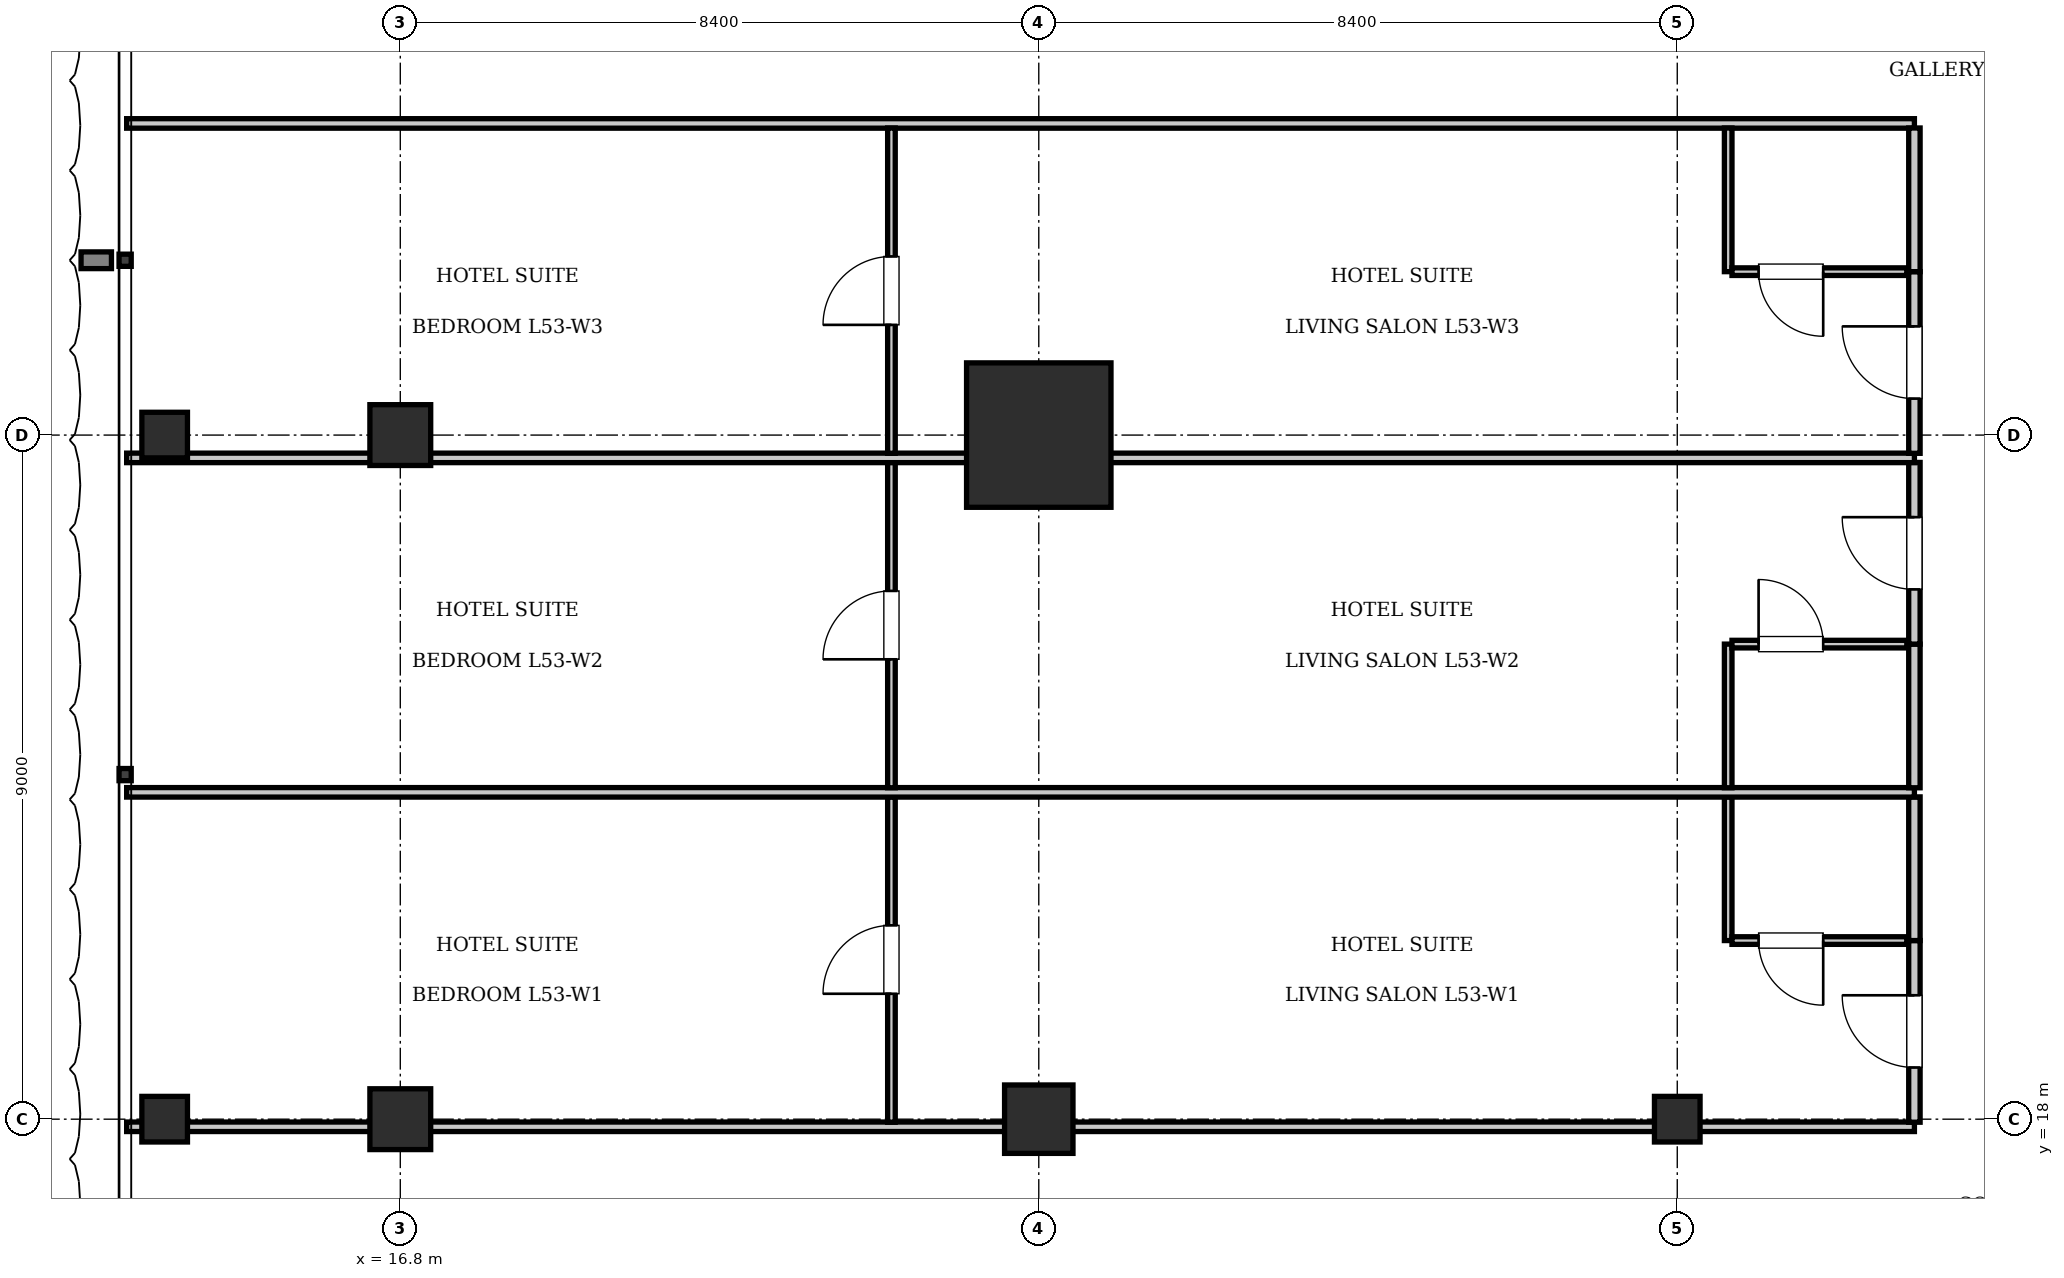
"""IFC4 building model, lengths in metres.
Left out: names, types, materials, properties, quantities, classifications, styles, units other than length and angle.
Written with IfcOpenShell. Run it as: python <this file> out.ifc"""

import sys

from ifc_helpers import new_model, si_unit, direction, frame, frame_2d, origin, origin_2d, place, context, subcontext, project, spatial, rectangle, i_section, extrude, element, fill, save


model = new_model("IFC4")
c1 = context("Model", 3, precision=1e-05, world=origin(), true_north=direction((0.0, 1.0)))
c2 = subcontext(c1, "Body", "Model", "MODEL_VIEW")
j1 = project(units=[si_unit("LENGTHUNIT", "METRE"), si_unit("PLANEANGLEUNIT", "RADIAN")], contexts=[c1])
p1 = place(None, origin())
s1 = spatial("IfcSite", under=j1, at=p1, CompositionType="ELEMENT")
p2 = place(p1, origin())
s2 = spatial("IfcBuilding", under=s1, at=p2, CompositionType="ELEMENT")
p3 = place(p2, frame((0.0, 0.0, 215.95)))
s3 = spatial("IfcBuildingStorey", under=s2, at=p3, CompositionType="ELEMENT", Elevation=215.95)
p4 = place(p3, frame((25.2, 27.0, 0.0), z_axis=(0.0, 0.0, 1.0), x_axis=(1.0, 0.0, 0.0)))
e1 = element("IfcColumn", 1, at=p4, inside=s3, PredefinedType="COLUMN", context=c2, shape_type="SweptSolid", body=[
    extrude(rectangle(XDim=1.9, YDim=1.9, at=origin_2d()), origin(), (0.0, 0.0, 1.0), 3.85),
])
p5 = place(p3, frame((25.2, 18.0, 0.0), z_axis=(0.0, 0.0, 1.0), x_axis=(1.0, 0.0, 0.0)))
e2 = element("IfcColumn", 2, at=p5, inside=s3, PredefinedType="COLUMN", context=c2, shape_type="SweptSolid", body=[
    extrude(rectangle(XDim=0.9, YDim=0.9, at=origin_2d()), origin(), (0.0, 0.0, 1.0), 3.85),
])
p6 = place(p3, frame((33.6, 18.0, 0.0), z_axis=(0.0, 0.0, 1.0), x_axis=(1.0, 0.0, 0.0)))
e3 = element("IfcColumn", 3, at=p6, inside=s3, PredefinedType="COLUMN", context=c2, shape_type="SweptSolid", body=[
    extrude(i_section(OverallWidth=0.6, OverallDepth=0.6, WebThickness=0.025, FlangeThickness=0.038, at=origin_2d()), origin(), (0.0, 0.0, 1.0), 3.85),
])
for number, where, z_axis, x_axis in (
    (4, (16.8, 18.0, 0.0), (0.0, 0.0, 1.0), (1.0, 0.0, 0.0)),
    (5, (16.8, 27.0, 0.0), (0.0, 0.0, 1.0), (1.0, 0.0, 0.0)),
):
    element("IfcColumn", number, at=place(p3, frame(where, z_axis=z_axis, x_axis=x_axis)), inside=s3, PredefinedType="COLUMN", context=c2, shape_type="SweptSolid", body=[
        extrude(rectangle(XDim=0.8, YDim=0.8, at=origin_2d()), origin(), (0.0, 0.0, 1.0), 3.85),
    ])
for number, where, z_axis, x_axis in (
    (6, (13.7, 18.0, 0.0), (0.0, 0.0, 1.0), (1.0, 0.0, 0.0)),
    (7, (13.7, 27.0, 0.0), (0.0, 0.0, 1.0), (1.0, 0.0, 0.0)),
):
    element("IfcColumn", number, at=place(p3, frame(where, z_axis=z_axis, x_axis=x_axis)), inside=s3, PredefinedType="COLUMN", context=c2, shape_type="SweptSolid", body=[
        extrude(i_section(OverallWidth=0.6, OverallDepth=0.6, WebThickness=0.025, FlangeThickness=0.038, at=origin_2d()), origin(), (0.0, 0.0, 1.0), 3.85),
    ])
p7 = place(p3, frame((13.2, 17.9, 0.0), z_axis=(0.0, 0.0, 1.0), x_axis=(1.0, 0.0, 0.0)))
e8 = element("IfcWall", 8, at=p7, inside=s3, PredefinedType="PARTITIONING", context=c2, shape_type="SweptSolid", body=[
    extrude(rectangle(XDim=23.52, YDim=0.125, at=frame_2d((11.76, 0.0))), origin(), (0.0, 0.0, 1.0), 3.071),
])
p8 = place(p3, frame((13.2, 31.1, 0.0), z_axis=(0.0, 0.0, 1.0), x_axis=(1.0, 0.0, 0.0)))
e9 = element("IfcWall", 9, at=p8, inside=s3, PredefinedType="PARTITIONING", context=c2, shape_type="SweptSolid", body=[
    extrude(rectangle(XDim=23.52, YDim=0.125, at=frame_2d((11.76, 0.0))), origin(), (0.0, 0.0, 1.0), 3.61),
])
p9 = place(p3, frame((36.72, 17.96, 0.0), z_axis=(0.0, 0.0, 1.0), x_axis=(0.0, 1.0, 0.0)))
e10 = element("IfcWall", 10, at=p9, inside=s3, PredefinedType="PARTITIONING", context=c2, shape_type="SweptSolid", body=[
    extrude(rectangle(XDim=2.39, YDim=0.15, at=frame_2d((1.195, 0.0))), origin(), (0.0, 0.0, 1.0), 3.61),
])
p10 = place(p9, frame((0.72, 0.0, 0.0)))
e11 = element("IfcOpeningElement", 11, at=p10, cuts=e10, PredefinedType="OPENING", context=c2, shape_type="SweptSolid", body=[
    extrude(rectangle(XDim=0.95, YDim=2.15, at=frame_2d((0.475, 1.075))), frame((0.0, 0.085, 0.0), z_axis=(0.0, -1.0, 0.0), x_axis=(1.0, 0.0, 0.0)), (0.0, 0.0, 1.0), 0.17),
])
p11 = place(p3, frame((36.72, 20.35, 0.0), z_axis=(0.0, 0.0, 1.0), x_axis=(0.0, 1.0, 0.0)))
e12 = element("IfcWall", 12, at=p11, inside=s3, PredefinedType="PARTITIONING", context=c2, shape_type="SweptSolid", body=[
    extrude(rectangle(XDim=1.89, YDim=0.15, at=frame_2d((0.945, 0.0))), origin(), (0.0, 0.0, 1.0), 3.61),
])
p12 = place(p3, frame((34.27, 20.35, 0.0), z_axis=(0.0, 0.0, 1.0), x_axis=(0.0, 1.0, 0.0)))
e13 = element("IfcWall", 13, at=p12, inside=s3, PredefinedType="PARTITIONING", context=c2, shape_type="SweptSolid", body=[
    extrude(rectangle(XDim=1.89, YDim=0.1, at=frame_2d((0.945, 0.0))), origin(), (0.0, 0.0, 1.0), 3.61),
])
p13 = place(p3, frame((34.32, 20.35, 0.0), z_axis=(0.0, 0.0, 1.0), x_axis=(1.0, 0.0, 0.0)))
e14 = element("IfcWall", 14, at=p13, inside=s3, PredefinedType="PARTITIONING", context=c2, shape_type="SweptSolid", body=[
    extrude(rectangle(XDim=2.3, YDim=0.1, at=frame_2d((1.15, 0.0))), origin(), (0.0, 0.0, 1.0), 3.61),
])
p14 = place(p13, frame((0.35, 0.0, 0.0)))
e15 = element("IfcOpeningElement", 15, at=p14, cuts=e14, PredefinedType="OPENING", context=c2, shape_type="SweptSolid", body=[
    extrude(rectangle(XDim=0.85, YDim=2.1, at=frame_2d((0.425, 1.05))), frame((0.0, 0.06, 0.0), z_axis=(0.0, -1.0, 0.0), x_axis=(1.0, 0.0, 0.0)), (0.0, 0.0, 1.0), 0.12),
])
p15 = place(p3, frame((23.262, 17.96, 0.0), z_axis=(0.0, 0.0, 1.0), x_axis=(0.0, 1.0, 0.0)))
e16 = element("IfcWall", 16, at=p15, inside=s3, PredefinedType="PARTITIONING", context=c2, shape_type="SweptSolid", body=[
    extrude(rectangle(XDim=4.28, YDim=0.1, at=frame_2d((2.14, 0.0))), origin(), (0.0, 0.0, 1.0), 3.61),
])
p16 = place(p15, frame((1.69, 0.0, 0.0)))
e17 = element("IfcOpeningElement", 17, at=p16, cuts=e16, PredefinedType="OPENING", context=c2, shape_type="SweptSolid", body=[
    extrude(rectangle(XDim=0.9, YDim=2.1, at=frame_2d((0.45, 1.05))), frame((0.0, 0.06, 0.0), z_axis=(0.0, -1.0, 0.0), x_axis=(1.0, 0.0, 0.0)), (0.0, 0.0, 1.0), 0.12),
])
p17 = place(p3, frame((13.2, 22.3, 0.0), z_axis=(0.0, 0.0, 1.0), x_axis=(1.0, 0.0, 0.0)))
e18 = element("IfcWall", 18, at=p17, inside=s3, PredefinedType="PARTITIONING", context=c2, shape_type="SweptSolid", body=[
    extrude(rectangle(XDim=23.52, YDim=0.125, at=frame_2d((11.76, 0.0))), origin(), (0.0, 0.0, 1.0), 3.61),
])
p18 = place(p3, frame((36.72, 22.36, 0.0), z_axis=(0.0, 0.0, 1.0), x_axis=(0.0, 1.0, 0.0)))
e19 = element("IfcWall", 19, at=p18, inside=s3, PredefinedType="PARTITIONING", context=c2, shape_type="SweptSolid", body=[
    extrude(rectangle(XDim=1.89, YDim=0.15, at=frame_2d((0.945, 0.0))), origin(), (0.0, 0.0, 1.0), 3.61),
])
p19 = place(p3, frame((36.72, 24.25, 0.0), z_axis=(0.0, 0.0, 1.0), x_axis=(0.0, 1.0, 0.0)))
e20 = element("IfcWall", 20, at=p19, inside=s3, PredefinedType="PARTITIONING", context=c2, shape_type="SweptSolid", body=[
    extrude(rectangle(XDim=2.39, YDim=0.15, at=frame_2d((1.195, 0.0))), origin(), (0.0, 0.0, 1.0), 3.61),
])
p20 = place(p19, frame((0.72, 0.0, 0.0)))
e21 = element("IfcOpeningElement", 21, at=p20, cuts=e20, PredefinedType="OPENING", context=c2, shape_type="SweptSolid", body=[
    extrude(rectangle(XDim=0.95, YDim=2.15, at=frame_2d((0.475, 1.075))), frame((0.0, 0.085, 0.0), z_axis=(0.0, -1.0, 0.0), x_axis=(1.0, 0.0, 0.0)), (0.0, 0.0, 1.0), 0.17),
])
p21 = place(p3, frame((34.27, 22.36, 0.0), z_axis=(0.0, 0.0, 1.0), x_axis=(0.0, 1.0, 0.0)))
e22 = element("IfcWall", 22, at=p21, inside=s3, PredefinedType="PARTITIONING", context=c2, shape_type="SweptSolid", body=[
    extrude(rectangle(XDim=1.89, YDim=0.1, at=frame_2d((0.945, 0.0))), origin(), (0.0, 0.0, 1.0), 3.61),
])
p22 = place(p3, frame((34.32, 24.25, 0.0), z_axis=(0.0, 0.0, 1.0), x_axis=(1.0, 0.0, 0.0)))
e23 = element("IfcWall", 23, at=p22, inside=s3, PredefinedType="PARTITIONING", context=c2, shape_type="SweptSolid", body=[
    extrude(rectangle(XDim=2.3, YDim=0.1, at=frame_2d((1.15, 0.0))), origin(), (0.0, 0.0, 1.0), 3.61),
])
p23 = place(p22, frame((0.35, 0.0, 0.0)))
e24 = element("IfcOpeningElement", 24, at=p23, cuts=e23, PredefinedType="OPENING", context=c2, shape_type="SweptSolid", body=[
    extrude(rectangle(XDim=0.85, YDim=2.1, at=frame_2d((0.425, 1.05))), frame((0.0, 0.06, 0.0), z_axis=(0.0, -1.0, 0.0), x_axis=(1.0, 0.0, 0.0)), (0.0, 0.0, 1.0), 0.12),
])
p24 = place(p3, frame((23.262, 22.36, 0.0), z_axis=(0.0, 0.0, 1.0), x_axis=(0.0, 1.0, 0.0)))
e25 = element("IfcWall", 25, at=p24, inside=s3, PredefinedType="PARTITIONING", context=c2, shape_type="SweptSolid", body=[
    extrude(rectangle(XDim=4.28, YDim=0.1, at=frame_2d((2.14, 0.0))), origin(), (0.0, 0.0, 1.0), 3.61),
])
p25 = place(p24, frame((1.69, 0.0, 0.0)))
e26 = element("IfcOpeningElement", 26, at=p25, cuts=e25, PredefinedType="OPENING", context=c2, shape_type="SweptSolid", body=[
    extrude(rectangle(XDim=0.9, YDim=2.1, at=frame_2d((0.45, 1.05))), frame((0.0, 0.06, 0.0), z_axis=(0.0, -1.0, 0.0), x_axis=(1.0, 0.0, 0.0)), (0.0, 0.0, 1.0), 0.12),
])
p26 = place(p3, frame((13.2, 26.7, 0.0), z_axis=(0.0, 0.0, 1.0), x_axis=(1.0, 0.0, 0.0)))
e27 = element("IfcWall", 27, at=p26, inside=s3, PredefinedType="PARTITIONING", context=c2, shape_type="SweptSolid", body=[
    extrude(rectangle(XDim=23.52, YDim=0.125, at=frame_2d((11.76, 0.0))), origin(), (0.0, 0.0, 1.0), 3.61),
])
p27 = place(p3, frame((36.72, 26.76, 0.0), z_axis=(0.0, 0.0, 1.0), x_axis=(0.0, 1.0, 0.0)))
e28 = element("IfcWall", 28, at=p27, inside=s3, PredefinedType="PARTITIONING", context=c2, shape_type="SweptSolid", body=[
    extrude(rectangle(XDim=2.39, YDim=0.15, at=frame_2d((1.195, 0.0))), origin(), (0.0, 0.0, 1.0), 3.61),
])
p28 = place(p27, frame((0.72, 0.0, 0.0)))
e29 = element("IfcOpeningElement", 29, at=p28, cuts=e28, PredefinedType="OPENING", context=c2, shape_type="SweptSolid", body=[
    extrude(rectangle(XDim=0.95, YDim=2.15, at=frame_2d((0.475, 1.075))), frame((0.0, 0.085, 0.0), z_axis=(0.0, -1.0, 0.0), x_axis=(1.0, 0.0, 0.0)), (0.0, 0.0, 1.0), 0.17),
])
p29 = place(p3, frame((36.72, 29.15, 0.0), z_axis=(0.0, 0.0, 1.0), x_axis=(0.0, 1.0, 0.0)))
e30 = element("IfcWall", 30, at=p29, inside=s3, PredefinedType="PARTITIONING", context=c2, shape_type="SweptSolid", body=[
    extrude(rectangle(XDim=1.89, YDim=0.15, at=frame_2d((0.945, 0.0))), origin(), (0.0, 0.0, 1.0), 3.61),
])
p30 = place(p3, frame((34.27, 29.15, 0.0), z_axis=(0.0, 0.0, 1.0), x_axis=(0.0, 1.0, 0.0)))
e31 = element("IfcWall", 31, at=p30, inside=s3, PredefinedType="PARTITIONING", context=c2, shape_type="SweptSolid", body=[
    extrude(rectangle(XDim=1.89, YDim=0.1, at=frame_2d((0.945, 0.0))), origin(), (0.0, 0.0, 1.0), 3.61),
])
p31 = place(p3, frame((34.32, 29.15, 0.0), z_axis=(0.0, 0.0, 1.0), x_axis=(1.0, 0.0, 0.0)))
e32 = element("IfcWall", 32, at=p31, inside=s3, PredefinedType="PARTITIONING", context=c2, shape_type="SweptSolid", body=[
    extrude(rectangle(XDim=2.3, YDim=0.1, at=frame_2d((1.15, 0.0))), origin(), (0.0, 0.0, 1.0), 3.61),
])
p32 = place(p31, frame((0.35, 0.0, 0.0)))
e33 = element("IfcOpeningElement", 33, at=p32, cuts=e32, PredefinedType="OPENING", context=c2, shape_type="SweptSolid", body=[
    extrude(rectangle(XDim=0.85, YDim=2.1, at=frame_2d((0.425, 1.05))), frame((0.0, 0.06, 0.0), z_axis=(0.0, -1.0, 0.0), x_axis=(1.0, 0.0, 0.0)), (0.0, 0.0, 1.0), 0.12),
])
p33 = place(p3, frame((23.262, 26.76, 0.0), z_axis=(0.0, 0.0, 1.0), x_axis=(0.0, 1.0, 0.0)))
e34 = element("IfcWall", 34, at=p33, inside=s3, PredefinedType="PARTITIONING", context=c2, shape_type="SweptSolid", body=[
    extrude(rectangle(XDim=4.28, YDim=0.1, at=frame_2d((2.14, 0.0))), origin(), (0.0, 0.0, 1.0), 3.61),
])
p34 = place(p33, frame((1.69, 0.0, 0.0)))
e35 = element("IfcOpeningElement", 35, at=p34, cuts=e34, PredefinedType="OPENING", context=c2, shape_type="SweptSolid", body=[
    extrude(rectangle(XDim=0.9, YDim=2.1, at=frame_2d((0.45, 1.05))), frame((0.0, 0.06, 0.0), z_axis=(0.0, -1.0, 0.0), x_axis=(1.0, 0.0, 0.0)), (0.0, 0.0, 1.0), 0.12),
])
p35 = place(p14, frame((0.85, 0.0, 0.0), z_axis=(0.0, 0.0, 1.0), x_axis=(-1.0, 0.0, 0.0)))
e36 = element("IfcDoor", 36, at=p35, inside=s3, OperationType="SINGLE_SWING_LEFT", PredefinedType="DOOR", context=c2, shape_type="SweptSolid", body=[
    extrude(rectangle(XDim=0.85, YDim=2.1, at=frame_2d((0.425, 1.05))), frame((0.0, 0.025, 0.0), z_axis=(0.0, -1.0, 0.0), x_axis=(1.0, 0.0, 0.0)), (0.0, 0.0, 1.0), 0.05),
])
fill(e15, e36)
p36 = place(p10, origin())
e37 = element("IfcDoor", 37, at=p36, inside=s3, OperationType="SINGLE_SWING_RIGHT", PredefinedType="DOOR", context=c2, shape_type="SweptSolid", body=[
    extrude(rectangle(XDim=0.95, YDim=2.15, at=frame_2d((0.475, 1.075))), frame((0.0, 0.025, 0.0), z_axis=(0.0, -1.0, 0.0), x_axis=(1.0, 0.0, 0.0)), (0.0, 0.0, 1.0), 0.05),
])
fill(e11, e37)
p37 = place(p16, origin())
e38 = element("IfcDoor", 38, at=p37, inside=s3, OperationType="SINGLE_SWING_LEFT", PredefinedType="DOOR", context=c2, shape_type="SweptSolid", body=[
    extrude(rectangle(XDim=0.9, YDim=2.1, at=frame_2d((0.45, 1.05))), frame((0.0, 0.025, 0.0), z_axis=(0.0, -1.0, 0.0), x_axis=(1.0, 0.0, 0.0)), (0.0, 0.0, 1.0), 0.05),
])
fill(e17, e38)
p38 = place(p23, origin())
e39 = element("IfcDoor", 39, at=p38, inside=s3, OperationType="SINGLE_SWING_LEFT", PredefinedType="DOOR", context=c2, shape_type="SweptSolid", body=[
    extrude(rectangle(XDim=0.85, YDim=2.1, at=frame_2d((0.425, 1.05))), frame((0.0, 0.025, 0.0), z_axis=(0.0, -1.0, 0.0), x_axis=(1.0, 0.0, 0.0)), (0.0, 0.0, 1.0), 0.05),
])
fill(e24, e39)
p39 = place(p20, origin())
e40 = element("IfcDoor", 40, at=p39, inside=s3, OperationType="SINGLE_SWING_RIGHT", PredefinedType="DOOR", context=c2, shape_type="SweptSolid", body=[
    extrude(rectangle(XDim=0.95, YDim=2.15, at=frame_2d((0.475, 1.075))), frame((0.0, 0.025, 0.0), z_axis=(0.0, -1.0, 0.0), x_axis=(1.0, 0.0, 0.0)), (0.0, 0.0, 1.0), 0.05),
])
fill(e21, e40)
p40 = place(p25, origin())
e41 = element("IfcDoor", 41, at=p40, inside=s3, OperationType="SINGLE_SWING_LEFT", PredefinedType="DOOR", context=c2, shape_type="SweptSolid", body=[
    extrude(rectangle(XDim=0.9, YDim=2.1, at=frame_2d((0.45, 1.05))), frame((0.0, 0.025, 0.0), z_axis=(0.0, -1.0, 0.0), x_axis=(1.0, 0.0, 0.0)), (0.0, 0.0, 1.0), 0.05),
])
fill(e26, e41)
p41 = place(p32, frame((0.85, 0.0, 0.0), z_axis=(0.0, 0.0, 1.0), x_axis=(-1.0, 0.0, 0.0)))
e42 = element("IfcDoor", 42, at=p41, inside=s3, OperationType="SINGLE_SWING_LEFT", PredefinedType="DOOR", context=c2, shape_type="SweptSolid", body=[
    extrude(rectangle(XDim=0.85, YDim=2.1, at=frame_2d((0.425, 1.05))), frame((0.0, 0.025, 0.0), z_axis=(0.0, -1.0, 0.0), x_axis=(1.0, 0.0, 0.0)), (0.0, 0.0, 1.0), 0.05),
])
fill(e33, e42)
p42 = place(p28, origin())
e43 = element("IfcDoor", 43, at=p42, inside=s3, OperationType="SINGLE_SWING_RIGHT", PredefinedType="DOOR", context=c2, shape_type="SweptSolid", body=[
    extrude(rectangle(XDim=0.95, YDim=2.15, at=frame_2d((0.475, 1.075))), frame((0.0, 0.025, 0.0), z_axis=(0.0, -1.0, 0.0), x_axis=(1.0, 0.0, 0.0)), (0.0, 0.0, 1.0), 0.05),
])
fill(e29, e43)
p43 = place(p34, origin())
e44 = element("IfcDoor", 44, at=p43, inside=s3, OperationType="SINGLE_SWING_LEFT", PredefinedType="DOOR", context=c2, shape_type="SweptSolid", body=[
    extrude(rectangle(XDim=0.9, YDim=2.1, at=frame_2d((0.45, 1.05))), frame((0.0, 0.025, 0.0), z_axis=(0.0, -1.0, 0.0), x_axis=(1.0, 0.0, 0.0)), (0.0, 0.0, 1.0), 0.05),
])
fill(e35, e44)
save(model, sys.argv[1])
